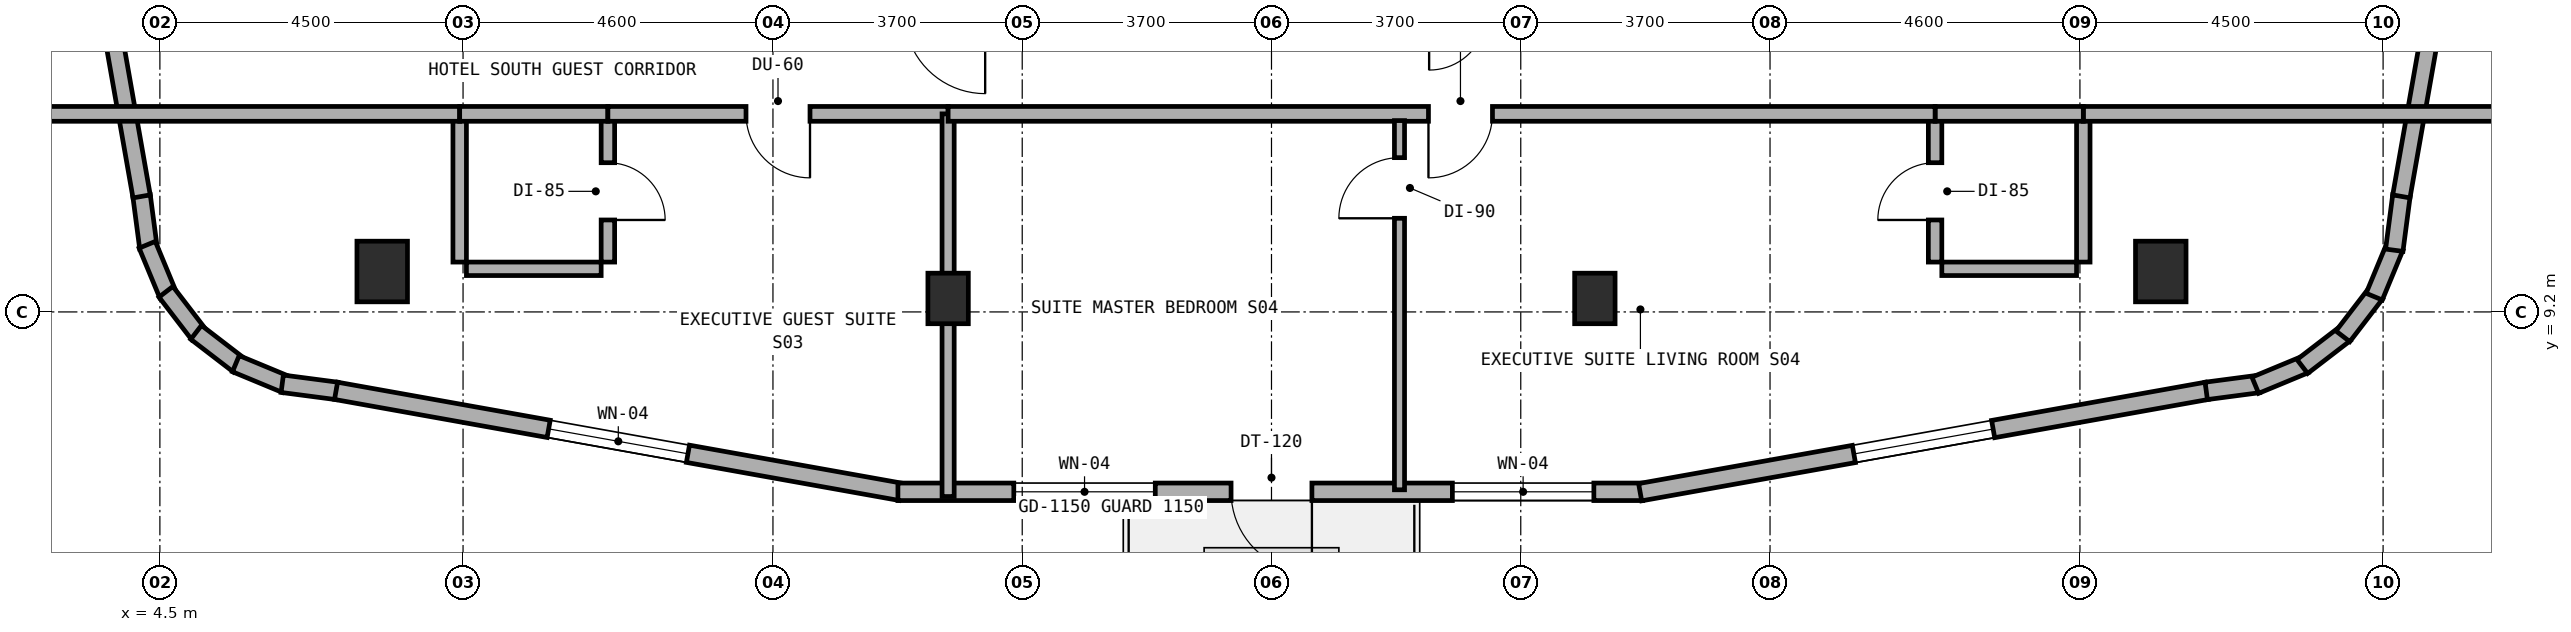
"""IFC4 building model, lengths in metres.
Left out: names, types, materials, properties, quantities, classifications, styles, units other than length and angle.
Written with IfcOpenShell. Run it as: python <this file> out.ifc"""

import sys

from ifc_helpers import new_model, si_unit, direction, frame, frame_2d, origin, origin_2d, place, context, subcontext, project, spatial, rectangle, extrude, element, fill, save


model = new_model("IFC4")
c1 = context("Model", 3, precision=1e-05, world=origin(), true_north=direction((0.0, 1.0)))
c2 = subcontext(c1, "Body", "Model", "MODEL_VIEW")
j1 = project(units=[si_unit("LENGTHUNIT", "METRE"), si_unit("PLANEANGLEUNIT", "RADIAN")], contexts=[c1])
p1 = place(None, origin())
s1 = spatial("IfcSite", under=j1, at=p1, CompositionType="ELEMENT")
p2 = place(p1, origin())
s2 = spatial("IfcBuilding", under=s1, at=p2, CompositionType="ELEMENT")
p3 = place(p2, frame((0.0, 0.0, 243.2)))
s3 = spatial("IfcBuildingStorey", under=s2, at=p3, CompositionType="ELEMENT", Elevation=243.2)
for number, where, z_axis, x_axis in (
    (1, (16.2, 9.4, 0.0), (0.0, 0.0, 1.0), (1.0, 0.0, 0.0)),
    (2, (25.8, 9.4, 0.0), (0.0, 0.0, 1.0), (1.0, 0.0, 0.0)),
):
    element("IfcColumn", number, at=place(p3, frame(where, z_axis=z_axis, x_axis=x_axis)), inside=s3, PredefinedType="COLUMN", context=c2, shape_type="SweptSolid", body=[
        extrude(rectangle(XDim=0.6, YDim=0.75, at=origin_2d()), origin(), (0.0, 0.0, 1.0), 3.6),
    ])
for number, where, z_axis, x_axis in (
    (3, (7.8, 9.8, 0.0), (0.0, 0.0, 1.0), (1.0, 0.0, 0.0)),
    (4, (34.2, 9.8, 0.0), (0.0, 0.0, 1.0), (1.0, 0.0, 0.0)),
):
    element("IfcColumn", number, at=place(p3, frame(where, z_axis=z_axis, x_axis=x_axis)), inside=s3, PredefinedType="COLUMN", context=c2, shape_type="SweptSolid", body=[
        extrude(rectangle(XDim=0.75, YDim=0.9, at=origin_2d()), origin(), (0.0, 0.0, 1.0), 3.6),
    ])
p4 = place(p3, frame((4.228, 10.925, 0.0), z_axis=(0.0, 0.0, 1.0), x_axis=(0.130689052056, -0.991423406861, 0.0)))
e5 = element("IfcWall", 5, at=p4, inside=s3, PredefinedType="STANDARD", context=c2, shape_type="SweptSolid", body=[
    extrude(rectangle(XDim=0.781, YDim=0.26, at=frame_2d((0.39, 0.0))), origin(), (0.0, 0.0, 1.0), 3.32),
])
p5 = place(p3, frame((4.312, 10.197, 0.0), z_axis=(0.0, 0.0, 1.0), x_axis=(0.382900540965, -0.923789573295, 0.0)))
e6 = element("IfcWall", 6, at=p5, inside=s3, PredefinedType="STANDARD", context=c2, shape_type="SweptSolid", body=[
    extrude(rectangle(XDim=0.799, YDim=0.26, at=frame_2d((0.399, 0.0))), origin(), (0.0, 0.0, 1.0), 3.32),
])
p6 = place(p3, frame((4.59, 9.499, 0.0), z_axis=(0.0, 0.0, 1.0), x_axis=(0.608823262828, -0.793305889705, 0.0)))
e7 = element("IfcWall", 7, at=p6, inside=s3, PredefinedType="STANDARD", context=c2, shape_type="SweptSolid", body=[
    extrude(rectangle(XDim=0.798, YDim=0.26, at=frame_2d((0.399, 0.0))), origin(), (0.0, 0.0, 1.0), 3.32),
])
p7 = place(p3, frame((5.038, 8.897, 0.0), z_axis=(0.0, 0.0, 1.0), x_axis=(0.793044635519, -0.60916352983, 0.0)))
e8 = element("IfcWall", 8, at=p7, inside=s3, PredefinedType="STANDARD", context=c2, shape_type="SweptSolid", body=[
    extrude(rectangle(XDim=0.798, YDim=0.26, at=frame_2d((0.399, 0.0))), origin(), (0.0, 0.0, 1.0), 3.32),
])
p8 = place(p3, frame((5.627, 8.432, 0.0), z_axis=(0.0, 0.0, 1.0), x_axis=(0.923789573295, -0.382900540965, 0.0)))
e9 = element("IfcWall", 9, at=p8, inside=s3, PredefinedType="STANDARD", context=c2, shape_type="SweptSolid", body=[
    extrude(rectangle(XDim=0.799, YDim=0.26, at=frame_2d((0.399, 0.0))), origin(), (0.0, 0.0, 1.0), 3.32),
])
p9 = place(p3, frame((6.316, 8.134, 0.0), z_axis=(0.0, 0.0, 1.0), x_axis=(0.99153354416, -0.129850802102, 0.0)))
e10 = element("IfcWall", 10, at=p9, inside=s3, PredefinedType="STANDARD", context=c2, shape_type="SweptSolid", body=[
    extrude(rectangle(XDim=0.816, YDim=0.26, at=frame_2d((0.408, 0.0))), origin(), (0.0, 0.0, 1.0), 3.32),
])
p10 = place(p3, frame((7.115, 8.029, 0.0), z_axis=(0.0, 0.0, 1.0), x_axis=(0.984367239349, -0.176128186549, 0.0)))
e11 = element("IfcWall", 11, at=p10, inside=s3, PredefinedType="STANDARD", context=c2, shape_type="SweptSolid", body=[
    extrude(rectangle(XDim=8.511, YDim=0.26, at=frame_2d((4.255, 0.0))), origin(), (0.0, 0.0, 1.0), 3.32),
])
p11 = place(p10, frame((3.206, 0.0, 0.85)))
e12 = element("IfcOpeningElement", 12, at=p11, cuts=e11, PredefinedType="OPENING", context=c2, shape_type="SweptSolid", body=[
    extrude(rectangle(XDim=2.1, YDim=1.5, at=frame_2d((1.05, 0.75))), frame((0.0, 0.14, 0.0), z_axis=(0.0, -1.0, 0.0), x_axis=(1.0, 0.0, 0.0)), (0.0, 0.0, 1.0), 0.28),
])
p12 = place(p3, frame((15.455, 6.53, 0.0), z_axis=(0.0, 0.0, 1.0), x_axis=(1.0, 0.0, 0.0)))
e13 = element("IfcWall", 13, at=p12, inside=s3, PredefinedType="STANDARD", context=c2, shape_type="SweptSolid", body=[
    extrude(rectangle(XDim=11.055, YDim=0.26, at=frame_2d((5.527, 0.0))), origin(), (0.0, 0.0, 1.0), 3.32),
])
p13 = place(p12, frame((4.945, 0.0, 0.0)))
e14 = element("IfcOpeningElement", 14, at=p13, cuts=e13, PredefinedType="OPENING", context=c2, shape_type="SweptSolid", body=[
    extrude(rectangle(XDim=1.2, YDim=2.15, at=frame_2d((0.6, 1.075))), frame((0.0, 0.14, 0.0), z_axis=(0.0, -1.0, 0.0), x_axis=(1.0, 0.0, 0.0)), (0.0, 0.0, 1.0), 0.28),
])
p14 = place(p12, frame((1.72, 0.0, 0.85)))
e15 = element("IfcOpeningElement", 15, at=p14, cuts=e13, PredefinedType="OPENING", context=c2, shape_type="SweptSolid", body=[
    extrude(rectangle(XDim=2.1, YDim=1.5, at=frame_2d((1.05, 0.75))), frame((0.0, 0.14, 0.0), z_axis=(0.0, -1.0, 0.0), x_axis=(1.0, 0.0, 0.0)), (0.0, 0.0, 1.0), 0.28),
])
p15 = place(p12, frame((8.23, 0.0, 0.85)))
e16 = element("IfcOpeningElement", 16, at=p15, cuts=e13, PredefinedType="OPENING", context=c2, shape_type="SweptSolid", body=[
    extrude(rectangle(XDim=2.1, YDim=1.5, at=frame_2d((1.05, 0.75))), frame((0.0, 0.14, 0.0), z_axis=(0.0, -1.0, 0.0), x_axis=(1.0, 0.0, 0.0)), (0.0, 0.0, 1.0), 0.28),
])
p16 = place(p3, frame((26.472, 6.524, 0.0), z_axis=(0.0, 0.0, 1.0), x_axis=(0.98437102902, 0.176107005047, 0.0)))
e17 = element("IfcWall", 17, at=p16, inside=s3, PredefinedType="STANDARD", context=c2, shape_type="SweptSolid", body=[
    extrude(rectangle(XDim=8.547, YDim=0.26, at=frame_2d((4.273, 0.0))), origin(), (0.0, 0.0, 1.0), 3.32),
])
p17 = place(p16, frame((3.223, 0.0, 0.85)))
e18 = element("IfcOpeningElement", 18, at=p17, cuts=e17, PredefinedType="OPENING", context=c2, shape_type="SweptSolid", body=[
    extrude(rectangle(XDim=2.1, YDim=1.5, at=frame_2d((1.05, 0.75))), frame((0.0, 0.14, 0.0), z_axis=(0.0, -1.0, 0.0), x_axis=(1.0, 0.0, 0.0)), (0.0, 0.0, 1.0), 0.28),
])
p18 = place(p3, frame((34.875, 8.028, 0.0), z_axis=(0.0, 0.0, 1.0), x_axis=(0.991458553189, 0.130422150372, 0.0)))
e19 = element("IfcWall", 19, at=p18, inside=s3, PredefinedType="STANDARD", context=c2, shape_type="SweptSolid", body=[
    extrude(rectangle(XDim=0.781, YDim=0.26, at=frame_2d((0.39, 0.0))), origin(), (0.0, 0.0, 1.0), 3.32),
])
p19 = place(p3, frame((35.603, 8.112, 0.0), z_axis=(0.0, 0.0, 1.0), x_axis=(0.923789573295, 0.382900540965, 0.0)))
e20 = element("IfcWall", 20, at=p19, inside=s3, PredefinedType="STANDARD", context=c2, shape_type="SweptSolid", body=[
    extrude(rectangle(XDim=0.799, YDim=0.26, at=frame_2d((0.399, 0.0))), origin(), (0.0, 0.0, 1.0), 3.32),
])
for number, where, z_axis, x_axis in (
    (21, (36.301, 8.39, 0.0), (0.0, 0.0, 1.0), (0.793, 0.609, 0.0)),
    (22, (36.903, 8.838, 0.0), (0.0, 0.0, 1.0), (0.609, 0.793, 0.0)),
):
    element("IfcWall", number, at=place(p3, frame(where, z_axis=z_axis, x_axis=x_axis)), inside=s3, PredefinedType="STANDARD", context=c2, shape_type="SweptSolid", body=[
        extrude(rectangle(XDim=0.798, YDim=0.26, at=frame_2d((0.399, 0.0))), origin(), (0.0, 0.0, 1.0), 3.32),
    ])
p20 = place(p3, frame((37.368, 9.427, 0.0), z_axis=(0.0, 0.0, 1.0), x_axis=(0.383161279238, 0.923681457047, 0.0)))
e23 = element("IfcWall", 23, at=p20, inside=s3, PredefinedType="STANDARD", context=c2, shape_type="SweptSolid", body=[
    extrude(rectangle(XDim=0.799, YDim=0.26, at=frame_2d((0.399, 0.0))), origin(), (0.0, 0.0, 1.0), 3.32),
])
p21 = place(p3, frame((37.666, 10.116, 0.0), z_axis=(0.0, 0.0, 1.0), x_axis=(0.129850802102, 0.99153354416, 0.0)))
e24 = element("IfcWall", 24, at=p21, inside=s3, PredefinedType="STANDARD", context=c2, shape_type="SweptSolid", body=[
    extrude(rectangle(XDim=0.816, YDim=0.26, at=frame_2d((0.408, 0.0))), origin(), (0.0, 0.0, 1.0), 3.32),
])
p22 = place(p3, frame((37.771, 10.915, 0.0), z_axis=(0.0, 0.0, 1.0), x_axis=(0.173396937698, 0.984852020355, 0.0)))
e25 = element("IfcWall", 25, at=p22, inside=s3, PredefinedType="STANDARD", context=c2, shape_type="SweptSolid", body=[
    extrude(rectangle(XDim=8.714, YDim=0.26, at=frame_2d((4.357, 0.0))), origin(), (0.0, 0.0, 1.0), 3.32),
])
p23 = place(p22, frame((4.647, 0.0, 0.85)))
e26 = element("IfcOpeningElement", 26, at=p23, cuts=e25, PredefinedType="OPENING", context=c2, shape_type="SweptSolid", body=[
    extrude(rectangle(XDim=2.1, YDim=1.5, at=frame_2d((1.05, 0.75))), frame((0.0, 0.14, 0.0), z_axis=(0.0, -1.0, 0.0), x_axis=(1.0, 0.0, 0.0)), (0.0, 0.0, 1.0), 0.28),
])
p24 = place(p3, frame((2.718, 19.497, 0.0), z_axis=(0.0, 0.0, 1.0), x_axis=(0.173396937698, -0.984852020355, 0.0)))
e27 = element("IfcWall", 27, at=p24, inside=s3, PredefinedType="STANDARD", context=c2, shape_type="SweptSolid", body=[
    extrude(rectangle(XDim=8.714, YDim=0.26, at=frame_2d((4.357, 0.0))), origin(), (0.0, 0.0, 1.0), 3.32),
])
p25 = place(p24, frame((2.627, 0.0, 0.85)))
e28 = element("IfcOpeningElement", 28, at=p25, cuts=e27, PredefinedType="OPENING", context=c2, shape_type="SweptSolid", body=[
    extrude(rectangle(XDim=2.1, YDim=1.5, at=frame_2d((1.05, 0.75))), frame((0.0, 0.14, 0.0), z_axis=(0.0, -1.0, 0.0), x_axis=(1.0, 0.0, 0.0)), (0.0, 0.0, 1.0), 0.28),
])
p26 = place(p3, frame((11.15, 9.94, 0.0), z_axis=(0.0, 0.0, 1.0), x_axis=(0.0, 1.0, 0.0)))
e29 = element("IfcWall", 29, at=p26, inside=s3, PredefinedType="PLUMBINGWALL", context=c2, shape_type="SweptSolid", body=[
    extrude(rectangle(XDim=2.1, YDim=0.2, at=frame_2d((1.05, 0.0))), origin(), (0.0, 0.0, 1.0), 2.995),
])
p27 = place(p26, frame((0.625, 0.0, 0.0)))
e30 = element("IfcOpeningElement", 30, at=p27, cuts=e29, PredefinedType="OPENING", context=c2, shape_type="SweptSolid", body=[
    extrude(rectangle(XDim=0.85, YDim=2.1, at=frame_2d((0.425, 1.05))), frame((0.0, 0.11, 0.0), z_axis=(0.0, -1.0, 0.0), x_axis=(1.0, 0.0, 0.0)), (0.0, 0.0, 1.0), 0.22),
])
p28 = place(p3, frame((9.05, 9.84, 0.0), z_axis=(0.0, 0.0, 1.0), x_axis=(1.0, 0.0, 0.0)))
e31 = element("IfcWall", 31, at=p28, inside=s3, PredefinedType="PLUMBINGWALL", context=c2, shape_type="SweptSolid", body=[
    extrude(rectangle(XDim=2.0, YDim=0.2, at=frame_2d((1.0, 0.0))), origin(), (0.0, 0.0, 1.0), 3.015),
])
p29 = place(p3, frame((8.95, 9.94, 0.0), z_axis=(0.0, 0.0, 1.0), x_axis=(0.0, 1.0, 0.0)))
e32 = element("IfcWall", 32, at=p29, inside=s3, PredefinedType="PLUMBINGWALL", context=c2, shape_type="SweptSolid", body=[
    extrude(rectangle(XDim=2.1, YDim=0.2, at=frame_2d((1.05, 0.0))), origin(), (0.0, 0.0, 1.0), 2.995),
])
p30 = place(p3, frame((2.76, 12.14, 0.0), z_axis=(0.0, 0.0, 1.0), x_axis=(1.0, 0.0, 0.0)))
e33 = element("IfcWall", 33, at=p30, inside=s3, PredefinedType="SOLIDWALL", context=c2, shape_type="SweptSolid", body=[
    extrude(rectangle(XDim=6.19, YDim=0.22, at=frame_2d((3.095, 0.0))), origin(), (0.0, 0.0, 1.0), 2.745),
])
p31 = place(p3, frame((8.95, 12.14, 0.0), z_axis=(0.0, 0.0, 1.0), x_axis=(1.0, 0.0, 0.0)))
e34 = element("IfcWall", 34, at=p31, inside=s3, PredefinedType="SOLIDWALL", context=c2, shape_type="SweptSolid", body=[
    extrude(rectangle(XDim=2.2, YDim=0.22, at=frame_2d((1.1, 0.0))), origin(), (0.0, 0.0, 1.0), 3.32),
])
p32 = place(p3, frame((11.15, 12.14, 0.0), z_axis=(0.0, 0.0, 1.0), x_axis=(1.0, 0.0, 0.0)))
e35 = element("IfcWall", 35, at=p32, inside=s3, PredefinedType="SOLIDWALL", context=c2, shape_type="SweptSolid", body=[
    extrude(rectangle(XDim=5.05, YDim=0.22, at=frame_2d((2.525, 0.0))), origin(), (0.0, 0.0, 1.0), 2.745),
])
p33 = place(p32, frame((2.05, 0.0, 0.0)))
e36 = element("IfcOpeningElement", 36, at=p33, cuts=e35, PredefinedType="OPENING", context=c2, shape_type="SweptSolid", body=[
    extrude(rectangle(XDim=0.95, YDim=2.1, at=frame_2d((0.475, 1.05))), frame((0.0, 0.12, 0.0), z_axis=(0.0, -1.0, 0.0), x_axis=(1.0, 0.0, 0.0)), (0.0, 0.0, 1.0), 0.24),
])
p34 = place(p3, frame((16.2, 6.46, 0.0), z_axis=(0.0, 0.0, 1.0), x_axis=(0.0, 1.0, 0.0)))
e37 = element("IfcWall", 37, at=p34, inside=s3, PredefinedType="SOLIDWALL", context=c2, shape_type="SweptSolid", body=[
    extrude(rectangle(XDim=5.68, YDim=0.18, at=frame_2d((2.84, 0.0))), origin(), (0.0, 0.0, 1.0), 2.745),
])
p35 = place(p3, frame((30.85, 9.94, 0.0), z_axis=(0.0, 0.0, 1.0), x_axis=(0.0, 1.0, 0.0)))
e38 = element("IfcWall", 38, at=p35, inside=s3, PredefinedType="PLUMBINGWALL", context=c2, shape_type="SweptSolid", body=[
    extrude(rectangle(XDim=2.1, YDim=0.2, at=frame_2d((1.05, 0.0))), origin(), (0.0, 0.0, 1.0), 2.995),
])
p36 = place(p35, frame((0.625, 0.0, 0.0)))
e39 = element("IfcOpeningElement", 39, at=p36, cuts=e38, PredefinedType="OPENING", context=c2, shape_type="SweptSolid", body=[
    extrude(rectangle(XDim=0.85, YDim=2.1, at=frame_2d((0.425, 1.05))), frame((0.0, 0.11, 0.0), z_axis=(0.0, -1.0, 0.0), x_axis=(1.0, 0.0, 0.0)), (0.0, 0.0, 1.0), 0.22),
])
p37 = place(p3, frame((30.95, 9.84, 0.0), z_axis=(0.0, 0.0, 1.0), x_axis=(1.0, 0.0, 0.0)))
e40 = element("IfcWall", 40, at=p37, inside=s3, PredefinedType="PLUMBINGWALL", context=c2, shape_type="SweptSolid", body=[
    extrude(rectangle(XDim=2.0, YDim=0.2, at=frame_2d((1.0, 0.0))), origin(), (0.0, 0.0, 1.0), 3.015),
])
p38 = place(p3, frame((33.05, 9.94, 0.0), z_axis=(0.0, 0.0, 1.0), x_axis=(0.0, 1.0, 0.0)))
e41 = element("IfcWall", 41, at=p38, inside=s3, PredefinedType="PLUMBINGWALL", context=c2, shape_type="SweptSolid", body=[
    extrude(rectangle(XDim=2.1, YDim=0.2, at=frame_2d((1.05, 0.0))), origin(), (0.0, 0.0, 1.0), 2.995),
])
p39 = place(p3, frame((33.05, 12.14, 0.0), z_axis=(0.0, 0.0, 1.0), x_axis=(1.0, 0.0, 0.0)))
e42 = element("IfcWall", 42, at=p39, inside=s3, PredefinedType="SOLIDWALL", context=c2, shape_type="SweptSolid", body=[
    extrude(rectangle(XDim=6.19, YDim=0.22, at=frame_2d((3.095, 0.0))), origin(), (0.0, 0.0, 1.0), 2.745),
])
p40 = place(p3, frame((30.85, 12.14, 0.0), z_axis=(0.0, 0.0, 1.0), x_axis=(1.0, 0.0, 0.0)))
e43 = element("IfcWall", 43, at=p40, inside=s3, PredefinedType="SOLIDWALL", context=c2, shape_type="SweptSolid", body=[
    extrude(rectangle(XDim=2.2, YDim=0.22, at=frame_2d((1.1, 0.0))), origin(), (0.0, 0.0, 1.0), 3.32),
])
p41 = place(p3, frame((16.2, 12.14, 0.0), z_axis=(0.0, 0.0, 1.0), x_axis=(1.0, 0.0, 0.0)))
e44 = element("IfcWall", 44, at=p41, inside=s3, PredefinedType="SOLIDWALL", context=c2, shape_type="SweptSolid", body=[
    extrude(rectangle(XDim=14.65, YDim=0.22, at=frame_2d((7.325, 0.0))), origin(), (0.0, 0.0, 1.0), 2.745),
])
p42 = place(p41, frame((7.13, 0.0, 0.0)))
e45 = element("IfcOpeningElement", 45, at=p42, cuts=e44, PredefinedType="OPENING", context=c2, shape_type="SweptSolid", body=[
    extrude(rectangle(XDim=0.95, YDim=2.1, at=frame_2d((0.475, 1.05))), frame((0.0, 0.12, 0.0), z_axis=(0.0, -1.0, 0.0), x_axis=(1.0, 0.0, 0.0)), (0.0, 0.0, 1.0), 0.24),
])
p43 = place(p3, frame((22.9, 6.56, 0.0), z_axis=(0.0, 0.0, 1.0), x_axis=(0.0, 1.0, 0.0)))
e46 = element("IfcWall", 46, at=p43, inside=s3, PredefinedType="PARTITIONING", context=c2, shape_type="SweptSolid", body=[
    extrude(rectangle(XDim=5.48, YDim=0.15, at=frame_2d((2.74, 0.0))), origin(), (0.0, 0.0, 1.0), 2.995),
])
p44 = place(p43, frame((4.03, 0.0, 0.0)))
e47 = element("IfcOpeningElement", 47, at=p44, cuts=e46, PredefinedType="OPENING", context=c2, shape_type="SweptSolid", body=[
    extrude(rectangle(XDim=0.9, YDim=2.1, at=frame_2d((0.45, 1.05))), frame((0.0, 0.085, 0.0), z_axis=(0.0, -1.0, 0.0), x_axis=(1.0, 0.0, 0.0)), (0.0, 0.0, 1.0), 0.17),
])
p45 = place(p11, origin())
e48 = element("IfcWindow", 48, at=p45, inside=s3, PartitioningType="SINGLE_PANEL", PredefinedType="WINDOW", context=c2, shape_type="SweptSolid", body=[
    extrude(rectangle(XDim=2.1, YDim=1.5, at=frame_2d((1.05, 0.75))), frame((0.0, 0.03, 0.0), z_axis=(0.0, -1.0, 0.0), x_axis=(1.0, 0.0, 0.0)), (0.0, 0.0, 1.0), 0.06),
])
fill(e12, e48)
p46 = place(p13, frame((1.2, 0.0, 0.0), z_axis=(0.0, 0.0, 1.0), x_axis=(-1.0, 0.0, 0.0)))
e49 = element("IfcDoor", 49, at=p46, inside=s3, OperationType="SINGLE_SWING_LEFT", PredefinedType="DOOR", context=c2, shape_type="SweptSolid", body=[
    extrude(rectangle(XDim=1.2, YDim=2.15, at=frame_2d((0.6, 1.075))), frame((0.0, 0.025, 0.0), z_axis=(0.0, -1.0, 0.0), x_axis=(1.0, 0.0, 0.0)), (0.0, 0.0, 1.0), 0.05),
])
fill(e14, e49)
p47 = place(p14, origin())
e50 = element("IfcWindow", 50, at=p47, inside=s3, PartitioningType="SINGLE_PANEL", PredefinedType="WINDOW", context=c2, shape_type="SweptSolid", body=[
    extrude(rectangle(XDim=2.1, YDim=1.5, at=frame_2d((1.05, 0.75))), frame((0.0, 0.03, 0.0), z_axis=(0.0, -1.0, 0.0), x_axis=(1.0, 0.0, 0.0)), (0.0, 0.0, 1.0), 0.06),
])
fill(e15, e50)
p48 = place(p15, origin())
e51 = element("IfcWindow", 51, at=p48, inside=s3, PartitioningType="SINGLE_PANEL", PredefinedType="WINDOW", context=c2, shape_type="SweptSolid", body=[
    extrude(rectangle(XDim=2.1, YDim=1.5, at=frame_2d((1.05, 0.75))), frame((0.0, 0.03, 0.0), z_axis=(0.0, -1.0, 0.0), x_axis=(1.0, 0.0, 0.0)), (0.0, 0.0, 1.0), 0.06),
])
fill(e16, e51)
p49 = place(p17, origin())
e52 = element("IfcWindow", 52, at=p49, inside=s3, PartitioningType="SINGLE_PANEL", PredefinedType="WINDOW", context=c2, shape_type="SweptSolid", body=[
    extrude(rectangle(XDim=2.1, YDim=1.5, at=frame_2d((1.05, 0.75))), frame((0.0, 0.03, 0.0), z_axis=(0.0, -1.0, 0.0), x_axis=(1.0, 0.0, 0.0)), (0.0, 0.0, 1.0), 0.06),
])
fill(e18, e52)
p50 = place(p27, frame((0.85, 0.0, 0.0), z_axis=(0.0, 0.0, 1.0), x_axis=(-1.0, 0.0, 0.0)))
e53 = element("IfcDoor", 53, at=p50, inside=s3, OperationType="SINGLE_SWING_RIGHT", PredefinedType="DOOR", context=c2, shape_type="SweptSolid", body=[
    extrude(rectangle(XDim=0.85, YDim=2.1, at=frame_2d((0.425, 1.05))), frame((0.0, 0.025, 0.0), z_axis=(0.0, -1.0, 0.0), x_axis=(1.0, 0.0, 0.0)), (0.0, 0.0, 1.0), 0.05),
])
fill(e30, e53)
p51 = place(p33, frame((0.95, 0.0, 0.0), z_axis=(0.0, 0.0, 1.0), x_axis=(-1.0, 0.0, 0.0)))
e54 = element("IfcDoor", 54, at=p51, inside=s3, OperationType="SINGLE_SWING_LEFT", PredefinedType="DOOR", context=c2, shape_type="SweptSolid", body=[
    extrude(rectangle(XDim=0.95, YDim=2.1, at=frame_2d((0.475, 1.05))), frame((0.0, 0.025, 0.0), z_axis=(0.0, -1.0, 0.0), x_axis=(1.0, 0.0, 0.0)), (0.0, 0.0, 1.0), 0.05),
])
fill(e36, e54)
p52 = place(p36, origin())
e55 = element("IfcDoor", 55, at=p52, inside=s3, OperationType="SINGLE_SWING_LEFT", PredefinedType="DOOR", context=c2, shape_type="SweptSolid", body=[
    extrude(rectangle(XDim=0.85, YDim=2.1, at=frame_2d((0.425, 1.05))), frame((0.0, 0.025, 0.0), z_axis=(0.0, -1.0, 0.0), x_axis=(1.0, 0.0, 0.0)), (0.0, 0.0, 1.0), 0.05),
])
fill(e39, e55)
p53 = place(p42, frame((0.95, 0.0, 0.0), z_axis=(0.0, 0.0, 1.0), x_axis=(-1.0, 0.0, 0.0)))
e56 = element("IfcDoor", 56, at=p53, inside=s3, OperationType="SINGLE_SWING_RIGHT", PredefinedType="DOOR", context=c2, shape_type="SweptSolid", body=[
    extrude(rectangle(XDim=0.95, YDim=2.1, at=frame_2d((0.475, 1.05))), frame((0.0, 0.025, 0.0), z_axis=(0.0, -1.0, 0.0), x_axis=(1.0, 0.0, 0.0)), (0.0, 0.0, 1.0), 0.05),
])
fill(e45, e56)
p54 = place(p44, origin())
e57 = element("IfcDoor", 57, at=p54, inside=s3, OperationType="SINGLE_SWING_LEFT", PredefinedType="DOOR", context=c2, shape_type="SweptSolid", body=[
    extrude(rectangle(XDim=0.9, YDim=2.1, at=frame_2d((0.45, 1.05))), frame((0.0, 0.025, 0.0), z_axis=(0.0, -1.0, 0.0), x_axis=(1.0, 0.0, 0.0)), (0.0, 0.0, 1.0), 0.05),
])
fill(e47, e57)
save(model, sys.argv[1])
